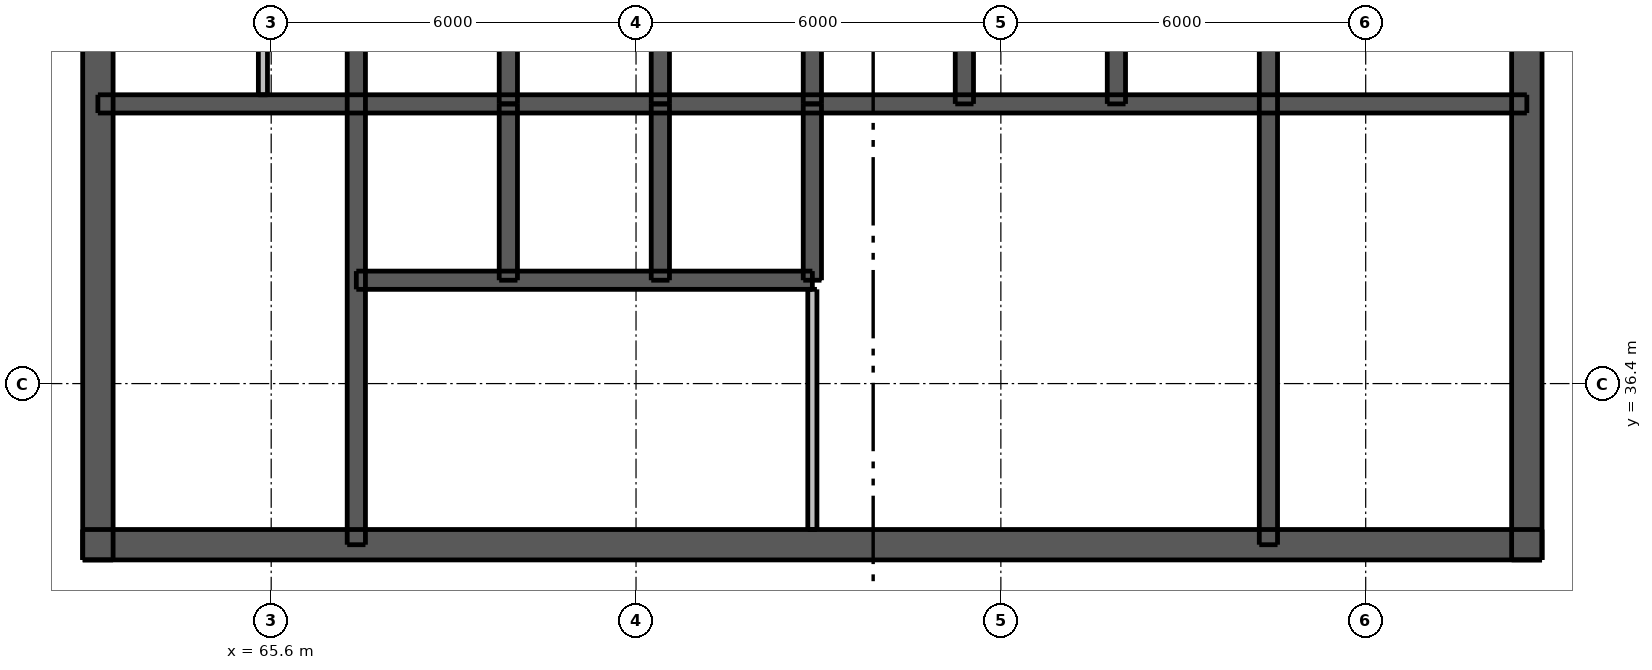
"""IFC4 building model, lengths in metres.
Left out: names, types, materials, properties, quantities, classifications, styles, units other than length and angle.
Written with IfcOpenShell. Run it as: python <this file> out.ifc"""

import sys

from ifc_helpers import new_model, si_unit, direction, frame, frame_2d, origin, place, context, subcontext, project, spatial, rectangle, extrude, element, fill, save


model = new_model("IFC4")
c1 = context("Model", 3, precision=1e-05, world=origin(), true_north=direction((0.0, 1.0)))
c2 = subcontext(c1, "Body", "Model", "MODEL_VIEW")
j1 = project(units=[si_unit("LENGTHUNIT", "METRE"), si_unit("PLANEANGLEUNIT", "RADIAN")], contexts=[c1])
p1 = place(None, origin())
s1 = spatial("IfcSite", under=j1, at=p1, CompositionType="ELEMENT")
p2 = place(p1, origin())
s2 = spatial("IfcBuilding", under=s1, at=p2, CompositionType="ELEMENT")
p3 = place(p2, frame((0.0, 0.0, 286.3)))
s3 = spatial("IfcBuildingStorey", under=s2, at=p3, CompositionType="ELEMENT", Elevation=286.3)
p4 = place(p3, frame((62.5, 33.75, 0.0), z_axis=(0.0, 0.0, 1.0), x_axis=(1.0, 0.0, 0.0)))
e1 = element("IfcWall", 1, at=p4, inside=s3, PredefinedType="SHEAR", context=c2, shape_type="SweptSolid", body=[
    extrude(rectangle(XDim=24.0, YDim=0.5, at=frame_2d((12.0, 0.0))), origin(), (0.0, 0.0, 1.0), 4.2),
])
p5 = place(p4, frame((1.875, 0.0, 0.0)))
e2 = element("IfcOpeningElement", 2, at=p5, cuts=e1, PredefinedType="OPENING", context=c2, shape_type="SweptSolid", body=[
    extrude(rectangle(XDim=1.1, YDim=2.1, at=frame_2d((0.55, 1.05))), frame((0.0, 0.26, 0.0), z_axis=(0.0, -1.0, 0.0), x_axis=(1.0, 0.0, 0.0)), (0.0, 0.0, 1.0), 0.52),
])
p6 = place(p4, frame((21.025, 0.0, 0.0)))
e3 = element("IfcOpeningElement", 3, at=p6, cuts=e1, PredefinedType="OPENING", context=c2, shape_type="SweptSolid", body=[
    extrude(rectangle(XDim=1.1, YDim=2.1, at=frame_2d((0.55, 1.05))), frame((0.0, 0.26, 0.0), z_axis=(0.0, -1.0, 0.0), x_axis=(1.0, 0.0, 0.0)), (0.0, 0.0, 1.0), 0.52),
])
p7 = place(p4, frame((8.0, 0.0, 0.0)))
e4 = element("IfcOpeningElement", 4, at=p7, cuts=e1, PredefinedType="OPENING", context=c2, shape_type="SweptSolid", body=[
    extrude(rectangle(XDim=1.1, YDim=2.1, at=frame_2d((0.55, 1.05))), frame((0.0, 0.26, 0.0), z_axis=(0.0, -1.0, 0.0), x_axis=(1.0, 0.0, 0.0)), (0.0, 0.0, 1.0), 0.52),
])
p8 = place(p4, frame((15.3, 0.0, 0.0)))
e5 = element("IfcOpeningElement", 5, at=p8, cuts=e1, PredefinedType="OPENING", context=c2, shape_type="SweptSolid", body=[
    extrude(rectangle(XDim=0.9, YDim=2.1, at=frame_2d((0.45, 1.05))), frame((0.0, 0.26, 0.0), z_axis=(0.0, -1.0, 0.0), x_axis=(1.0, 0.0, 0.0)), (0.0, 0.0, 1.0), 0.52),
])
p9 = place(p3, frame((62.75, 33.5, 0.0), z_axis=(0.0, 0.0, 1.0), x_axis=(0.0, 1.0, 0.0)))
e6 = element("IfcWall", 6, at=p9, inside=s3, PredefinedType="SHEAR", context=c2, shape_type="SweptSolid", body=[
    extrude(rectangle(XDim=24.0, YDim=0.5, at=frame_2d((12.0, 0.0))), origin(), (0.0, 0.0, 1.0), 4.2),
])
p10 = place(p9, frame((11.2, 0.0, 0.0)))
e7 = element("IfcOpeningElement", 7, at=p10, cuts=e6, PredefinedType="OPENING", context=c2, shape_type="SweptSolid", body=[
    extrude(rectangle(XDim=1.6, YDim=2.1, at=frame_2d((0.8, 1.05))), frame((0.0, 0.26, 0.0), z_axis=(0.0, -1.0, 0.0), x_axis=(1.0, 0.0, 0.0)), (0.0, 0.0, 1.0), 0.52),
])
p11 = place(p3, frame((86.25, 33.5, 0.0), z_axis=(0.0, 0.0, 1.0), x_axis=(0.0, 1.0, 0.0)))
e8 = element("IfcWall", 8, at=p11, inside=s3, PredefinedType="SHEAR", context=c2, shape_type="SweptSolid", body=[
    extrude(rectangle(XDim=24.0, YDim=0.5, at=frame_2d((12.0, 0.0))), origin(), (0.0, 0.0, 1.0), 4.2),
])
p12 = place(p11, frame((11.2, 0.0, 0.0)))
e9 = element("IfcOpeningElement", 9, at=p12, cuts=e8, PredefinedType="OPENING", context=c2, shape_type="SweptSolid", body=[
    extrude(rectangle(XDim=1.6, YDim=2.1, at=frame_2d((0.8, 1.05))), frame((0.0, 0.26, 0.0), z_axis=(0.0, -1.0, 0.0), x_axis=(1.0, 0.0, 0.0)), (0.0, 0.0, 1.0), 0.52),
])
p13 = place(p3, frame((62.75, 41.0, 0.0), z_axis=(0.0, 0.0, 1.0), x_axis=(1.0, 0.0, 0.0)))
e10 = element("IfcWall", 10, at=p13, inside=s3, PredefinedType="SHEAR", context=c2, shape_type="SweptSolid", body=[
    extrude(rectangle(XDim=23.5, YDim=0.3, at=frame_2d((11.75, 0.0))), origin(), (0.0, 0.0, 1.0), 4.2),
])
p14 = place(p3, frame((67.0, 33.75, 0.0), z_axis=(0.0, 0.0, 1.0), x_axis=(0.0, 1.0, 0.0)))
e11 = element("IfcWall", 11, at=p14, inside=s3, PredefinedType="SHEAR", context=c2, shape_type="SweptSolid", body=[
    extrude(rectangle(XDim=10.15, YDim=0.3, at=frame_2d((5.075, 0.0))), origin(), (0.0, 0.0, 1.0), 4.2),
])
p15 = place(p14, frame((0.45, 0.0, 0.0)))
e12 = element("IfcOpeningElement", 12, at=p15, cuts=e11, PredefinedType="OPENING", context=c2, shape_type="SweptSolid", body=[
    extrude(rectangle(XDim=1.1, YDim=2.1, at=frame_2d((0.55, 1.05))), frame((0.0, 0.16, 0.0), z_axis=(0.0, -1.0, 0.0), x_axis=(1.0, 0.0, 0.0)), (0.0, 0.0, 1.0), 0.32),
])
p16 = place(p3, frame((82.0, 33.75, 0.0), z_axis=(0.0, 0.0, 1.0), x_axis=(0.0, 1.0, 0.0)))
e13 = element("IfcWall", 13, at=p16, inside=s3, PredefinedType="SHEAR", context=c2, shape_type="SweptSolid", body=[
    extrude(rectangle(XDim=10.15, YDim=0.3, at=frame_2d((5.075, 0.0))), origin(), (0.0, 0.0, 1.0), 4.2),
])
for number, where, z_axis, x_axis in (
    (14, (69.5, 41.0, 0.0), (0.0, 0.0, 1.0), (0.0, 1.0, 0.0)),
    (15, (72.0, 41.0, 0.0), (0.0, 0.0, 1.0), (0.0, 1.0, 0.0)),
    (16, (74.5, 41.0, 0.0), (0.0, 0.0, 1.0), (0.0, 1.0, 0.0)),
    (17, (77.0, 41.0, 0.0), (0.0, 0.0, 1.0), (0.0, 1.0, 0.0)),
    (18, (79.5, 41.0, 0.0), (0.0, 0.0, 1.0), (0.0, 1.0, 0.0)),
):
    element("IfcWall", number, at=place(p3, frame(where, z_axis=z_axis, x_axis=x_axis)), inside=s3, PredefinedType="SHEAR", context=c2, shape_type="SweptSolid", body=[
        extrude(rectangle(XDim=2.9, YDim=0.3, at=frame_2d((1.45, 0.0))), origin(), (0.0, 0.0, 1.0), 4.2),
    ])
p17 = place(p3, frame((67.0, 38.1, 0.0), z_axis=(0.0, 0.0, 1.0), x_axis=(1.0, 0.0, 0.0)))
e19 = element("IfcWall", 19, at=p17, inside=s3, PredefinedType="SHEAR", context=c2, shape_type="SweptSolid", body=[
    extrude(rectangle(XDim=7.5, YDim=0.3, at=frame_2d((3.75, 0.0))), origin(), (0.0, 0.0, 1.0), 4.2),
])
p18 = place(p17, frame((0.7, 0.0, 0.0)))
e20 = element("IfcOpeningElement", 20, at=p18, cuts=e19, PredefinedType="OPENING", context=c2, shape_type="SweptSolid", body=[
    extrude(rectangle(XDim=1.1, YDim=2.1, at=frame_2d((0.55, 1.05))), frame((0.0, 0.16, 0.0), z_axis=(0.0, -1.0, 0.0), x_axis=(1.0, 0.0, 0.0)), (0.0, 0.0, 1.0), 0.32),
])
p19 = place(p17, frame((3.2, 0.0, 0.0)))
e21 = element("IfcOpeningElement", 21, at=p19, cuts=e19, PredefinedType="OPENING", context=c2, shape_type="SweptSolid", body=[
    extrude(rectangle(XDim=1.1, YDim=2.1, at=frame_2d((0.55, 1.05))), frame((0.0, 0.16, 0.0), z_axis=(0.0, -1.0, 0.0), x_axis=(1.0, 0.0, 0.0)), (0.0, 0.0, 1.0), 0.32),
])
p20 = place(p17, frame((5.65, 0.0, 0.0)))
e22 = element("IfcOpeningElement", 22, at=p20, cuts=e19, PredefinedType="OPENING", context=c2, shape_type="SweptSolid", body=[
    extrude(rectangle(XDim=1.2, YDim=2.1, at=frame_2d((0.6, 1.05))), frame((0.0, 0.16, 0.0), z_axis=(0.0, -1.0, 0.0), x_axis=(1.0, 0.0, 0.0)), (0.0, 0.0, 1.0), 0.32),
])
for number, where, z_axis, x_axis in (
    (23, (69.5, 38.1, 0.0), (0.0, 0.0, 1.0), (0.0, 1.0, 0.0)),
    (24, (72.0, 38.1, 0.0), (0.0, 0.0, 1.0), (0.0, 1.0, 0.0)),
    (25, (74.5, 38.1, 0.0), (0.0, 0.0, 1.0), (0.0, 1.0, 0.0)),
):
    element("IfcWall", number, at=place(p3, frame(where, z_axis=z_axis, x_axis=x_axis)), inside=s3, PredefinedType="SHEAR", context=c2, shape_type="SweptSolid", body=[
        extrude(rectangle(XDim=2.9, YDim=0.3, at=frame_2d((1.45, 0.0))), origin(), (0.0, 0.0, 1.0), 4.2),
    ])
p21 = place(p3, frame((74.5, 34.0, 0.0), z_axis=(0.0, 0.0, 1.0), x_axis=(0.0, 1.0, 0.0)))
e26 = element("IfcWall", 26, at=p21, inside=s3, PredefinedType="PLUMBINGWALL", context=c2, shape_type="SweptSolid", body=[
    extrude(rectangle(XDim=3.95, YDim=0.15, at=frame_2d((1.975, 0.0))), origin(), (0.0, 0.0, 1.0), 4.2),
])
p22 = place(p3, frame((65.464, 41.15, 0.0), z_axis=(0.0, 0.0, 1.0), x_axis=(0.0, 1.0, 0.0)))
e27 = element("IfcWall", 27, at=p22, inside=s3, PredefinedType="PLUMBINGWALL", context=c2, shape_type="SweptSolid", body=[
    extrude(rectangle(XDim=2.6, YDim=0.15, at=frame_2d((1.3, 0.0))), origin(), (0.0, 0.0, 1.0), 4.2),
])
p23 = place(p5, origin())
e28 = element("IfcDoor", 28, at=p23, inside=s3, OperationType="SINGLE_SWING_LEFT", PredefinedType="DOOR", context=c2, shape_type="SweptSolid", body=[
    extrude(rectangle(XDim=1.1, YDim=2.1, at=frame_2d((0.55, 1.05))), frame((0.0, 0.237, 0.0), z_axis=(0.0, -1.0, 0.0), x_axis=(1.0, 0.0, 0.0)), (0.0, 0.0, 1.0), 0.05),
])
fill(e2, e28)
p24 = place(p6, origin())
e29 = element("IfcDoor", 29, at=p24, inside=s3, OperationType="SINGLE_SWING_RIGHT", PredefinedType="DOOR", context=c2, shape_type="SweptSolid", body=[
    extrude(rectangle(XDim=1.1, YDim=2.1, at=frame_2d((0.55, 1.05))), frame((0.0, 0.237, 0.0), z_axis=(0.0, -1.0, 0.0), x_axis=(1.0, 0.0, 0.0)), (0.0, 0.0, 1.0), 0.05),
])
fill(e3, e29)
p25 = place(p7, origin())
e30 = element("IfcDoor", 30, at=p25, inside=s3, OperationType="SINGLE_SWING_LEFT", PredefinedType="DOOR", context=c2, shape_type="SweptSolid", body=[
    extrude(rectangle(XDim=1.1, YDim=2.1, at=frame_2d((0.55, 1.05))), frame((0.0, 0.237, 0.0), z_axis=(0.0, -1.0, 0.0), x_axis=(1.0, 0.0, 0.0)), (0.0, 0.0, 1.0), 0.05),
])
fill(e4, e30)
p26 = place(p15, origin())
e31 = element("IfcDoor", 31, at=p26, inside=s3, OperationType="SINGLE_SWING_RIGHT", PredefinedType="DOOR", context=c2, shape_type="SweptSolid", body=[
    extrude(rectangle(XDim=1.1, YDim=2.1, at=frame_2d((0.55, 1.05))), frame((0.0, -0.087, 0.0), z_axis=(0.0, -1.0, 0.0), x_axis=(1.0, 0.0, 0.0)), (0.0, 0.0, 1.0), 0.05),
])
fill(e12, e31)
p27 = place(p8, origin())
e32 = element("IfcDoor", 32, at=p27, inside=s3, OperationType="SINGLE_SWING_LEFT", PredefinedType="DOOR", context=c2, shape_type="SweptSolid", body=[
    extrude(rectangle(XDim=0.9, YDim=2.1, at=frame_2d((0.45, 1.05))), frame((0.0, 0.237, 0.0), z_axis=(0.0, -1.0, 0.0), x_axis=(1.0, 0.0, 0.0)), (0.0, 0.0, 1.0), 0.05),
])
fill(e5, e32)
p28 = place(p18, origin())
e33 = element("IfcDoor", 33, at=p28, inside=s3, OperationType="DOUBLE_DOOR_SLIDING", PredefinedType="DOOR", context=c2, shape_type="SweptSolid", body=[
    extrude(rectangle(XDim=1.1, YDim=2.1, at=frame_2d((0.55, 1.05))), frame((0.0, 0.025, 0.0), z_axis=(0.0, -1.0, 0.0), x_axis=(1.0, 0.0, 0.0)), (0.0, 0.0, 1.0), 0.05),
])
fill(e20, e33)
p29 = place(p19, origin())
e34 = element("IfcDoor", 34, at=p29, inside=s3, OperationType="DOUBLE_DOOR_SLIDING", PredefinedType="DOOR", context=c2, shape_type="SweptSolid", body=[
    extrude(rectangle(XDim=1.1, YDim=2.1, at=frame_2d((0.55, 1.05))), frame((0.0, 0.025, 0.0), z_axis=(0.0, -1.0, 0.0), x_axis=(1.0, 0.0, 0.0)), (0.0, 0.0, 1.0), 0.05),
])
fill(e21, e34)
p30 = place(p20, origin())
e35 = element("IfcDoor", 35, at=p30, inside=s3, OperationType="DOUBLE_DOOR_SLIDING", PredefinedType="DOOR", context=c2, shape_type="SweptSolid", body=[
    extrude(rectangle(XDim=1.2, YDim=2.1, at=frame_2d((0.6, 1.05))), frame((0.0, 0.025, 0.0), z_axis=(0.0, -1.0, 0.0), x_axis=(1.0, 0.0, 0.0)), (0.0, 0.0, 1.0), 0.05),
])
fill(e22, e35)
save(model, sys.argv[1])
